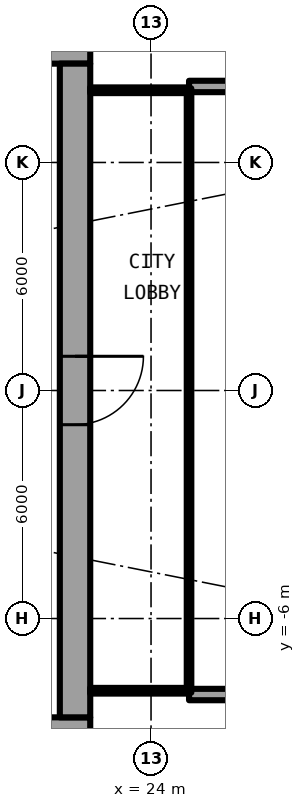
"""IFC4 building model, lengths in metres.
Left out: names, types, materials, properties, quantities, classifications, styles, units other than length and angle.
Written with IfcOpenShell. Run it as: python <this file> out.ifc"""

import sys

from ifc_helpers import new_model, si_unit, direction, frame, frame_2d, origin, place, context, subcontext, project, spatial, rectangle, extrude, element, fill, save


model = new_model("IFC4")
c1 = context("Model", 3, precision=1e-05, world=origin(), true_north=direction((0.0, 1.0)))
c2 = subcontext(c1, "Body", "Model", "MODEL_VIEW")
j1 = project(units=[si_unit("LENGTHUNIT", "METRE"), si_unit("PLANEANGLEUNIT", "RADIAN")], contexts=[c1])
p1 = place(None, origin())
s1 = spatial("IfcSite", under=j1, at=p1, CompositionType="ELEMENT")
p2 = place(p1, origin())
s2 = spatial("IfcBuilding", under=s1, at=p2, CompositionType="ELEMENT")
p3 = place(p2, frame((0.0, 0.0, 28.9)))
s3 = spatial("IfcBuildingStorey", under=s2, at=p3, CompositionType="ELEMENT", Elevation=28.9)
for number, where, z_axis, x_axis in (
    (1, (25.0, 8.0, 0.0), (0.0, 0.0, 1.0), (1.0, 0.0, 0.0)),
    (2, (25.0, -8.0, 0.0), (0.0, 0.0, 1.0), (1.0, 0.0, 0.0)),
):
    element("IfcWall", number, at=place(p3, frame(where, z_axis=z_axis, x_axis=x_axis)), inside=s3, PredefinedType="SOLIDWALL", context=c2, shape_type="SweptSolid", body=[
        extrude(rectangle(XDim=2.667, YDim=0.3, at=frame_2d((1.333, 0.0))), origin(), (0.0, 0.0, 1.0), 2.7),
    ])
p4 = place(p3, frame((22.4, 9.0, 0.0), z_axis=(0.0, 0.0, 1.0), x_axis=(-1.0, 0.0, 0.0)))
e3 = element("IfcWall", 3, at=p4, inside=s3, PredefinedType="SHEAR", context=c2, shape_type="SweptSolid", body=[
    extrude(rectangle(XDim=14.2, YDim=0.8, at=frame_2d((7.1, 0.0))), origin(), (0.0, 0.0, 1.0), 3.05),
])
p5 = place(p4, frame((1.325, 0.0, 0.0)))
e4 = element("IfcOpeningElement", 4, at=p5, cuts=e3, PredefinedType="OPENING", context=c2, shape_type="SweptSolid", body=[
    extrude(rectangle(XDim=1.2, YDim=2.3, at=frame_2d((0.6, 1.15))), frame((0.0, 0.41, 0.0), z_axis=(0.0, -1.0, 0.0), x_axis=(1.0, 0.0, 0.0)), (0.0, 0.0, 1.0), 0.82),
])
p6 = place(p3, frame((8.2, -9.0, 0.0), z_axis=(0.0, 0.0, 1.0), x_axis=(1.0, 0.0, 0.0)))
e5 = element("IfcWall", 5, at=p6, inside=s3, PredefinedType="SHEAR", context=c2, shape_type="SweptSolid", body=[
    extrude(rectangle(XDim=14.2, YDim=0.8, at=frame_2d((7.1, 0.0))), origin(), (0.0, 0.0, 1.0), 3.05),
])
p7 = place(p6, frame((11.675, 0.0, 0.0)))
e6 = element("IfcOpeningElement", 6, at=p7, cuts=e5, PredefinedType="OPENING", context=c2, shape_type="SweptSolid", body=[
    extrude(rectangle(XDim=1.2, YDim=2.3, at=frame_2d((0.6, 1.15))), frame((0.0, 0.41, 0.0), z_axis=(0.0, -1.0, 0.0), x_axis=(1.0, 0.0, 0.0)), (0.0, 0.0, 1.0), 0.82),
])
p8 = place(p3, frame((22.0, 8.6, 0.0), z_axis=(0.0, 0.0, 1.0), x_axis=(0.0, -1.0, 0.0)))
e7 = element("IfcWall", 7, at=p8, inside=s3, PredefinedType="SHEAR", context=c2, shape_type="SweptSolid", body=[
    extrude(rectangle(XDim=17.2, YDim=0.8, at=frame_2d((8.6, 0.0))), origin(), (0.0, 0.0, 1.0), 3.05),
])
p9 = place(p8, frame((7.7, 0.0, 0.0)))
e8 = element("IfcOpeningElement", 8, at=p9, cuts=e7, PredefinedType="OPENING", context=c2, shape_type="SweptSolid", body=[
    extrude(rectangle(XDim=1.8, YDim=2.3, at=frame_2d((0.9, 1.15))), frame((0.0, 0.41, 0.0), z_axis=(0.0, -1.0, 0.0), x_axis=(1.0, 0.0, 0.0)), (0.0, 0.0, 1.0), 0.82),
])
for number, where, z_axis, x_axis in (
    (9, (22.4, -7.9, 0.0), (0.0, 0.0, 1.0), (1.0, 0.0, 0.0)),
    (10, (22.4, 7.9, 0.0), (0.0, 0.0, 1.0), (1.0, 0.0, 0.0)),
):
    element("IfcWall", number, at=place(p3, frame(where, z_axis=z_axis, x_axis=x_axis)), inside=s3, PredefinedType="PARTITIONING", context=c2, shape_type="SweptSolid", body=[
        extrude(rectangle(XDim=2.54, YDim=0.15, at=frame_2d((1.27, 0.0))), origin(), (0.0, 0.0, 1.0), 2.7),
    ])
p10 = place(p3, frame((25.0, -7.95, 0.0), z_axis=(0.0, 0.0, 1.0), x_axis=(0.0, 1.0, 0.0)))
e11 = element("IfcWall", 11, at=p10, inside=s3, PredefinedType="PARTITIONING", context=c2, shape_type="SweptSolid", body=[
    extrude(rectangle(XDim=15.9, YDim=0.12, at=frame_2d((7.95, 0.0))), origin(), (0.0, 0.0, 1.0), 2.7),
])
p11 = place(p10, frame((0.95, 0.0, 0.1)))
e12 = element("IfcOpeningElement", 12, at=p11, cuts=e11, PredefinedType="OPENING", context=c2, shape_type="SweptSolid", body=[
    extrude(rectangle(XDim=14.0, YDim=2.35, at=frame_2d((7.0, 1.175))), frame((0.0, 0.07, 0.0), z_axis=(0.0, -1.0, 0.0), x_axis=(1.0, 0.0, 0.0)), (0.0, 0.0, 1.0), 0.14),
])
p12 = place(p9, origin())
e13 = element("IfcDoor", 13, at=p12, inside=s3, OperationType="SINGLE_SWING_LEFT", PredefinedType="DOOR", context=c2, shape_type="SweptSolid", body=[
    extrude(rectangle(XDim=1.8, YDim=2.3, at=frame_2d((0.9, 1.15))), frame((0.0, 0.025, 0.0), z_axis=(0.0, -1.0, 0.0), x_axis=(1.0, 0.0, 0.0)), (0.0, 0.0, 1.0), 0.05),
])
fill(e8, e13)
p13 = place(p11, origin())
e14 = element("IfcWindow", 14, at=p13, inside=s3, PartitioningType="SINGLE_PANEL", PredefinedType="WINDOW", context=c2, shape_type="SweptSolid", body=[
    extrude(rectangle(XDim=14.0, YDim=2.35, at=frame_2d((7.0, 1.175))), frame((0.0, 0.03, 0.0), z_axis=(0.0, -1.0, 0.0), x_axis=(1.0, 0.0, 0.0)), (0.0, 0.0, 1.0), 0.06),
])
fill(e12, e14)
save(model, sys.argv[1])
